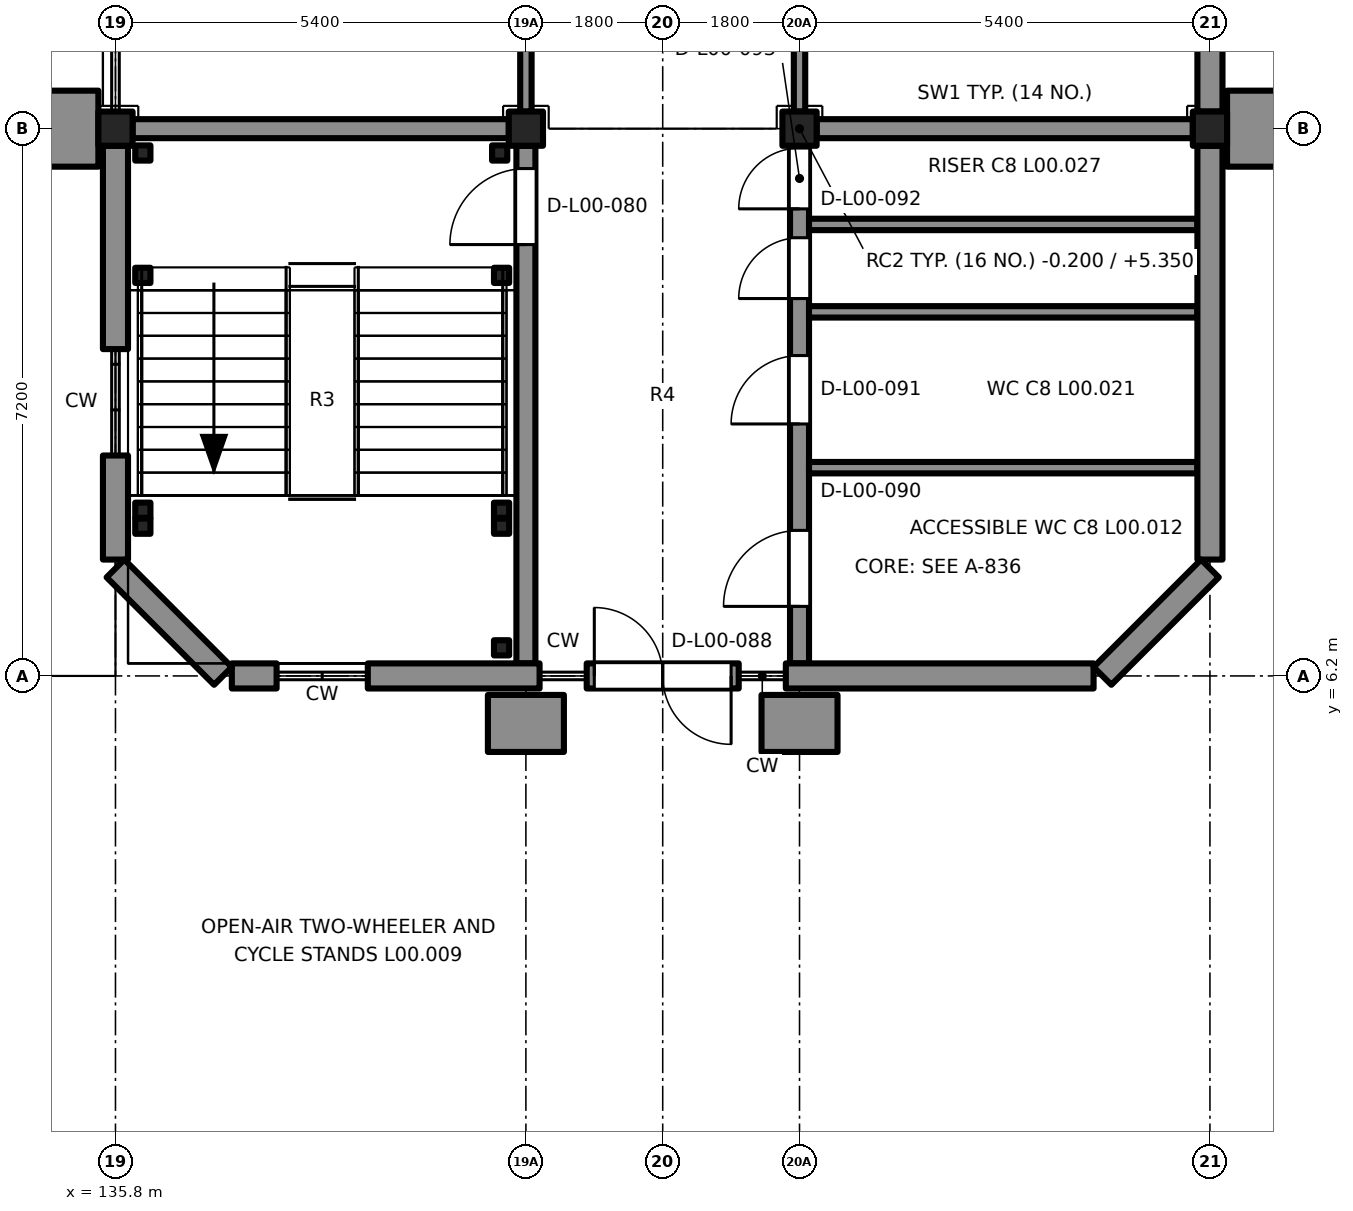
"""IFC4 building model, lengths in metres.
Left out: names, types, materials, properties, quantities, classifications, styles, units other than length and angle.
Written with IfcOpenShell. Run it as: python <this file> out.ifc"""

import sys

from ifc_helpers import new_model, si_unit, direction, frame, frame_2d, origin, origin_2d, place, context, subcontext, project, spatial, rectangle, extrude, element, fill, save


model = new_model("IFC4")
c1 = context("Model", 3, precision=1e-05, world=origin(), true_north=direction((0.0, 1.0)))
c2 = subcontext(c1, "Body", "Model", "MODEL_VIEW")
j1 = project(units=[si_unit("LENGTHUNIT", "METRE"), si_unit("PLANEANGLEUNIT", "RADIAN")], contexts=[c1])
p1 = place(None, origin())
s1 = spatial("IfcSite", under=j1, at=p1, CompositionType="ELEMENT")
p2 = place(p1, origin())
s2 = spatial("IfcBuilding", under=s1, at=p2, CompositionType="ELEMENT")
p3 = place(p2, origin())
s3 = spatial("IfcBuildingStorey", under=s2, at=p3, CompositionType="ELEMENT", Elevation=0.0)
for number, where, z_axis, x_axis in (
    (1, (135.8, 13.4, -0.2), (0.0, 0.0, 1.0), (1.0, 0.0, 0.0)),
    (2, (141.2, 13.4, -0.2), (0.0, 0.0, 1.0), (1.0, 0.0, 0.0)),
    (3, (144.8, 13.4, -0.2), (0.0, 0.0, 1.0), (1.0, 0.0, 0.0)),
    (4, (150.2, 13.4, -0.2), (0.0, 0.0, 1.0), (1.0, 0.0, 0.0)),
):
    element("IfcColumn", number, at=place(p3, frame(where, z_axis=z_axis, x_axis=x_axis)), inside=s3, PredefinedType="COLUMN", context=c2, shape_type="SweptSolid", body=[
        extrude(rectangle(XDim=0.45, YDim=0.45, at=origin_2d()), origin(), (0.0, 0.0, 1.0), 5.55),
    ])
p4 = place(p3, frame((141.2, 6.365, 0.0), z_axis=(0.0, 0.0, 1.0), x_axis=(0.0, 1.0, 0.0)))
e5 = element("IfcWall", 5, at=p4, inside=s3, PredefinedType="SHEAR", context=c2, shape_type="SweptSolid", body=[
    extrude(rectangle(XDim=6.81, YDim=0.25, at=frame_2d((3.405, 0.0))), origin(), (0.0, 0.0, 1.0), 6.05),
])
p5 = place(p4, frame((5.51, 0.0, 0.0)))
e6 = element("IfcOpeningElement", 6, at=p5, cuts=e5, PredefinedType="OPENING", context=c2, shape_type="SweptSolid", body=[
    extrude(rectangle(XDim=1.0, YDim=2.1, at=frame_2d((0.5, 1.05))), frame((0.0, 0.135, 0.0), z_axis=(0.0, -1.0, 0.0), x_axis=(1.0, 0.0, 0.0)), (0.0, 0.0, 1.0), 0.27),
])
p6 = place(p3, frame((136.025, 13.4, 0.0), z_axis=(0.0, 0.0, 1.0), x_axis=(1.0, 0.0, 0.0)))
e7 = element("IfcWall", 7, at=p6, inside=s3, PredefinedType="SHEAR", context=c2, shape_type="SweptSolid", body=[
    extrude(rectangle(XDim=4.95, YDim=0.25, at=frame_2d((2.475, 0.0))), origin(), (0.0, 0.0, 1.0), 6.05),
])
p7 = place(p3, frame((144.8, 6.365, 0.0), z_axis=(0.0, 0.0, 1.0), x_axis=(0.0, 1.0, 0.0)))
e8 = element("IfcWall", 8, at=p7, inside=s3, PredefinedType="SHEAR", context=c2, shape_type="SweptSolid", body=[
    extrude(rectangle(XDim=6.81, YDim=0.25, at=frame_2d((3.405, 0.0))), origin(), (0.0, 0.0, 1.0), 6.05),
])
p8 = place(p7, frame((0.75, 0.0, 0.0)))
e9 = element("IfcOpeningElement", 9, at=p8, cuts=e8, PredefinedType="OPENING", context=c2, shape_type="SweptSolid", body=[
    extrude(rectangle(XDim=1.0, YDim=2.1, at=frame_2d((0.5, 1.05))), frame((0.0, 0.135, 0.0), z_axis=(0.0, -1.0, 0.0), x_axis=(1.0, 0.0, 0.0)), (0.0, 0.0, 1.0), 0.27),
])
p9 = place(p7, frame((3.15, 0.0, 0.0)))
e10 = element("IfcOpeningElement", 10, at=p9, cuts=e8, PredefinedType="OPENING", context=c2, shape_type="SweptSolid", body=[
    extrude(rectangle(XDim=0.9, YDim=2.1, at=frame_2d((0.45, 1.05))), frame((0.0, 0.135, 0.0), z_axis=(0.0, -1.0, 0.0), x_axis=(1.0, 0.0, 0.0)), (0.0, 0.0, 1.0), 0.27),
])
p10 = place(p7, frame((4.8, 0.0, 0.0)))
e11 = element("IfcOpeningElement", 11, at=p10, cuts=e8, PredefinedType="OPENING", context=c2, shape_type="SweptSolid", body=[
    extrude(rectangle(XDim=0.8, YDim=2.1, at=frame_2d((0.4, 1.05))), frame((0.0, 0.135, 0.0), z_axis=(0.0, -1.0, 0.0), x_axis=(1.0, 0.0, 0.0)), (0.0, 0.0, 1.0), 0.27),
])
p11 = place(p7, frame((5.98, 0.0, 0.0)))
e12 = element("IfcOpeningElement", 12, at=p11, cuts=e8, PredefinedType="OPENING", context=c2, shape_type="SweptSolid", body=[
    extrude(rectangle(XDim=0.8, YDim=2.1, at=frame_2d((0.4, 1.05))), frame((0.0, 0.135, 0.0), z_axis=(0.0, -1.0, 0.0), x_axis=(1.0, 0.0, 0.0)), (0.0, 0.0, 1.0), 0.27),
])
p12 = place(p3, frame((145.025, 13.4, 0.0), z_axis=(0.0, 0.0, 1.0), x_axis=(1.0, 0.0, 0.0)))
e13 = element("IfcWall", 13, at=p12, inside=s3, PredefinedType="SHEAR", context=c2, shape_type="SweptSolid", body=[
    extrude(rectangle(XDim=4.95, YDim=0.25, at=frame_2d((2.475, 0.0))), origin(), (0.0, 0.0, 1.0), 6.05),
])
for number, where, z_axis, x_axis in (
    (14, (144.925, 8.94, 0.0), (0.0, 0.0, 1.0), (1.0, 0.0, 0.0)),
    (15, (144.925, 10.99, 0.0), (0.0, 0.0, 1.0), (1.0, 0.0, 0.0)),
    (16, (144.925, 12.14, 0.0), (0.0, 0.0, 1.0), (1.0, 0.0, 0.0)),
):
    element("IfcWall", number, at=place(p3, frame(where, z_axis=z_axis, x_axis=x_axis)), inside=s3, PredefinedType="PARTITIONING", context=c2, shape_type="SweptSolid", body=[
        extrude(rectangle(XDim=5.11, YDim=0.15, at=frame_2d((2.555, 0.0))), origin(), (0.0, 0.0, 1.0), 6.05),
    ])
p13 = place(p3, frame((136.16, 8.38, 0.0), z_axis=(0.0, 0.0, 1.0), x_axis=(1.0, 0.0, 0.0)))
e17 = element("IfcColumn", 17, at=p13, inside=s3, PredefinedType="COLUMN", context=c2, shape_type="SweptSolid", body=[
    extrude(rectangle(XDim=0.2, YDim=0.2, at=origin_2d()), origin(), (0.0, 0.0, 1.0), 4.45),
])
p14 = place(p3, frame((140.88, 6.57, 0.0), z_axis=(0.0, 0.0, 1.0), x_axis=(1.0, 0.0, 0.0)))
e18 = element("IfcColumn", 18, at=p14, inside=s3, PredefinedType="COLUMN", context=c2, shape_type="SweptSolid", body=[
    extrude(rectangle(XDim=0.2, YDim=0.2, at=origin_2d()), origin(), (0.0, 0.0, 1.0), 6.3),
])
p15 = place(p3, frame((140.88, 8.38, 0.0), z_axis=(0.0, 0.0, 1.0), x_axis=(1.0, 0.0, 0.0)))
e19 = element("IfcColumn", 19, at=p15, inside=s3, PredefinedType="COLUMN", context=c2, shape_type="SweptSolid", body=[
    extrude(rectangle(XDim=0.2, YDim=0.2, at=origin_2d()), origin(), (0.0, 0.0, 1.0), 4.45),
])
for number, where, z_axis, x_axis in (
    (20, (136.16, 11.47, 0.0), (0.0, 0.0, 1.0), (1.0, 0.0, 0.0)),
    (21, (136.16, 13.08, 0.0), (0.0, 0.0, 1.0), (1.0, 0.0, 0.0)),
    (22, (140.88, 11.47, 0.0), (0.0, 0.0, 1.0), (1.0, 0.0, 0.0)),
    (23, (140.855, 13.08, 0.0), (0.0, 0.0, 1.0), (1.0, 0.0, 0.0)),
):
    element("IfcColumn", number, at=place(p3, frame(where, z_axis=z_axis, x_axis=x_axis)), inside=s3, PredefinedType="COLUMN", context=c2, shape_type="SweptSolid", body=[
        extrude(rectangle(XDim=0.2, YDim=0.2, at=origin_2d()), origin(), (0.0, 0.0, 1.0), 2.95),
    ])
for number, where, z_axis, x_axis in (
    (24, (136.16, 8.17, 0.0), (0.0, 0.0, 1.0), (1.0, 0.0, 0.0)),
    (25, (140.88, 8.17, 0.0), (0.0, 0.0, 1.0), (1.0, 0.0, 0.0)),
):
    element("IfcColumn", number, at=place(p3, frame(where, z_axis=z_axis, x_axis=x_axis)), inside=s3, PredefinedType="COLUMN", context=c2, shape_type="SweptSolid", body=[
        extrude(rectangle(XDim=0.2, YDim=0.2, at=origin_2d()), origin(), (0.0, 0.0, 1.0), 6.3),
    ])
p16 = place(p3, frame((135.8, 7.731, 0.0), z_axis=(0.0, 0.0, 1.0), x_axis=(0.0, 1.0, 0.0)))
e26 = element("IfcWall", 26, at=p16, inside=s3, PredefinedType="SOLIDWALL", context=c2, shape_type="SweptSolid", body=[
    extrude(rectangle(XDim=1.369, YDim=0.33, at=frame_2d((0.685, 0.0))), origin(), (0.0, 0.0, 1.0), 5.35),
])
p17 = place(p3, frame((135.8, 10.5, 0.0), z_axis=(0.0, 0.0, 1.0), x_axis=(0.0, 1.0, 0.0)))
e27 = element("IfcWall", 27, at=p17, inside=s3, PredefinedType="SOLIDWALL", context=c2, shape_type="SweptSolid", body=[
    extrude(rectangle(XDim=2.675, YDim=0.33, at=frame_2d((1.337, 0.0))), origin(), (0.0, 0.0, 1.0), 5.35),
])
p18 = place(p3, frame((135.2, 12.9, 0.0), z_axis=(0.0, 0.0, 1.0), x_axis=(0.0, 1.0, 0.0)))
e28 = element("IfcWall", 28, at=p18, inside=s3, PredefinedType="SOLIDWALL", context=c2, shape_type="SweptSolid", body=[
    extrude(rectangle(XDim=1.0, YDim=0.75, at=frame_2d((0.5, 0.0))), origin(), (0.0, 0.0, 1.0), 6.3),
])
p19 = place(p3, frame((150.2, 13.175, 0.0), z_axis=(0.0, 0.0, 1.0), x_axis=(0.0, -1.0, 0.0)))
e29 = element("IfcWall", 29, at=p19, inside=s3, PredefinedType="SOLIDWALL", context=c2, shape_type="SweptSolid", body=[
    extrude(rectangle(XDim=5.444, YDim=0.33, at=frame_2d((2.722, 0.0))), origin(), (0.0, 0.0, 1.0), 5.35),
])
p20 = place(p3, frame((150.2, 20.375, 0.0), z_axis=(0.0, 0.0, 1.0), x_axis=(0.0, -1.0, 0.0)))
e30 = element("IfcWall", 30, at=p20, inside=s3, PredefinedType="SOLIDWALL", context=c2, shape_type="SweptSolid", body=[
    extrude(rectangle(XDim=6.75, YDim=0.33, at=frame_2d((3.375, 0.0))), origin(), (0.0, 0.0, 1.0), 5.35),
])
p21 = place(p20, frame((4.575, 0.0, 0.6)))
e31 = element("IfcOpeningElement", 31, at=p21, cuts=e30, PredefinedType="OPENING", context=c2, shape_type="SweptSolid", body=[
    extrude(rectangle(XDim=1.2, YDim=2.1, at=frame_2d((0.6, 1.05))), frame((0.0, 0.175, 0.0), z_axis=(0.0, -1.0, 0.0), x_axis=(1.0, 0.0, 0.0)), (0.0, 0.0, 1.0), 0.35),
])
p22 = place(p20, frame((0.975, 0.0, 0.6)))
e32 = element("IfcOpeningElement", 32, at=p22, cuts=e30, PredefinedType="OPENING", context=c2, shape_type="SweptSolid", body=[
    extrude(rectangle(XDim=1.2, YDim=2.1, at=frame_2d((0.6, 1.05))), frame((0.0, 0.175, 0.0), z_axis=(0.0, -1.0, 0.0), x_axis=(1.0, 0.0, 0.0)), (0.0, 0.0, 1.0), 0.35),
])
p23 = place(p3, frame((150.8, 13.9, 0.0), z_axis=(0.0, 0.0, 1.0), x_axis=(0.0, -1.0, 0.0)))
e33 = element("IfcWall", 33, at=p23, inside=s3, PredefinedType="SOLIDWALL", context=c2, shape_type="SweptSolid", body=[
    extrude(rectangle(XDim=1.0, YDim=0.75, at=frame_2d((0.5, 0.0))), origin(), (0.0, 0.0, 1.0), 6.3),
])
p24 = place(p3, frame((137.92, 6.2, 0.0), z_axis=(0.0, 0.0, 1.0), x_axis=(-1.0, 0.0, 0.0)))
e34 = element("IfcWall", 34, at=p24, inside=s3, PredefinedType="SOLIDWALL", context=c2, shape_type="SweptSolid", body=[
    extrude(rectangle(XDim=0.589, YDim=0.33, at=frame_2d((0.294, 0.0))), origin(), (0.0, 0.0, 1.0), 5.5),
])
p25 = place(p3, frame((141.38, 6.2, 0.0), z_axis=(0.0, 0.0, 1.0), x_axis=(-1.0, 0.0, 0.0)))
e35 = element("IfcWall", 35, at=p25, inside=s3, PredefinedType="SOLIDWALL", context=c2, shape_type="SweptSolid", body=[
    extrude(rectangle(XDim=2.26, YDim=0.33, at=frame_2d((1.13, 0.0))), origin(), (0.0, 0.0, 1.0), 5.5),
])
p26 = place(p3, frame((144.0, 6.2, 0.0), z_axis=(0.0, 0.0, 1.0), x_axis=(-1.0, 0.0, 0.0)))
e36 = element("IfcWall", 36, at=p26, inside=s3, PredefinedType="SOLIDWALL", context=c2, shape_type="SweptSolid", body=[
    extrude(rectangle(XDim=2.0, YDim=0.33, at=frame_2d((1.0, 0.0))), origin(), (0.0, 0.0, 1.0), 5.5),
])
p27 = place(p26, frame((0.1, 0.0, 0.0)))
e37 = element("IfcOpeningElement", 37, at=p27, cuts=e36, PredefinedType="OPENING", context=c2, shape_type="SweptSolid", body=[
    extrude(rectangle(XDim=1.8, YDim=2.4, at=frame_2d((0.9, 1.2))), frame((0.0, 0.175, 0.0), z_axis=(0.0, -1.0, 0.0), x_axis=(1.0, 0.0, 0.0)), (0.0, 0.0, 1.0), 0.35),
])
p28 = place(p3, frame((148.669, 6.2, 0.0), z_axis=(0.0, 0.0, 1.0), x_axis=(-1.0, 0.0, 0.0)))
e38 = element("IfcWall", 38, at=p28, inside=s3, PredefinedType="SOLIDWALL", context=c2, shape_type="SweptSolid", body=[
    extrude(rectangle(XDim=4.049, YDim=0.33, at=frame_2d((2.024, 0.0))), origin(), (0.0, 0.0, 1.0), 5.5),
])
for number, where, z_axis, x_axis in (
    (39, (141.7, 5.575, 0.0), (0.0, 0.0, 1.0), (-1.0, 0.0, 0.0)),
    (40, (145.3, 5.575, 0.0), (0.0, 0.0, 1.0), (-1.0, 0.0, 0.0)),
):
    element("IfcWall", number, at=place(p3, frame(where, z_axis=z_axis, x_axis=x_axis)), inside=s3, PredefinedType="SOLIDWALL", context=c2, shape_type="SweptSolid", body=[
        extrude(rectangle(XDim=1.0, YDim=0.75, at=frame_2d((0.5, 0.0))), origin(), (0.0, 0.0, 1.0), 6.3),
    ])
for number, where, z_axis, x_axis in (
    (41, (135.8, 7.614, 0.0), (0.0, 0.0, 1.0), (0.707, -0.707, 0.0)),
    (42, (150.2, 7.614, 0.0), (0.0, 0.0, 1.0), (-0.707, -0.707, 0.0)),
):
    element("IfcWall", number, at=place(p3, frame(where, z_axis=z_axis, x_axis=x_axis)), inside=s3, PredefinedType="SOLIDWALL", context=c2, shape_type="SweptSolid", body=[
        extrude(rectangle(XDim=2.0, YDim=0.33, at=frame_2d((1.0, 0.0))), origin(), (0.0, 0.0, 1.0), 5.5),
    ])
p29 = place(p3, frame((141.2, 13.625, 0.0), z_axis=(0.0, 0.0, 1.0), x_axis=(0.0, 1.0, 0.0)))
e43 = element("IfcWall", 43, at=p29, inside=s3, PredefinedType="PARTITIONING", context=c2, shape_type="SweptSolid", body=[
    extrude(rectangle(XDim=6.75, YDim=0.15, at=frame_2d((3.375, 0.0))), origin(), (0.0, 0.0, 1.0), 5.35),
])
p30 = place(p29, frame((1.075, 0.0, 0.0)))
e44 = element("IfcOpeningElement", 44, at=p30, cuts=e43, PredefinedType="OPENING", context=c2, shape_type="SweptSolid", body=[
    extrude(rectangle(XDim=1.0, YDim=2.1, at=frame_2d((0.5, 1.05))), frame((0.0, 0.085, 0.0), z_axis=(0.0, -1.0, 0.0), x_axis=(1.0, 0.0, 0.0)), (0.0, 0.0, 1.0), 0.17),
])
p31 = place(p3, frame((144.8, 20.375, 0.0), z_axis=(0.0, 0.0, 1.0), x_axis=(0.0, -1.0, 0.0)))
e45 = element("IfcWall", 45, at=p31, inside=s3, PredefinedType="PARTITIONING", context=c2, shape_type="SweptSolid", body=[
    extrude(rectangle(XDim=6.75, YDim=0.15, at=frame_2d((3.375, 0.0))), origin(), (0.0, 0.0, 1.0), 5.35),
])
p32 = place(p31, frame((4.675, 0.0, 0.0)))
e46 = element("IfcOpeningElement", 46, at=p32, cuts=e45, PredefinedType="OPENING", context=c2, shape_type="SweptSolid", body=[
    extrude(rectangle(XDim=1.0, YDim=2.1, at=frame_2d((0.5, 1.05))), frame((0.0, 0.085, 0.0), z_axis=(0.0, -1.0, 0.0), x_axis=(1.0, 0.0, 0.0)), (0.0, 0.0, 1.0), 0.17),
])
p33 = place(p5, origin())
e47 = element("IfcDoor", 47, at=p33, inside=s3, OperationType="SINGLE_SWING_RIGHT", PredefinedType="DOOR", context=c2, shape_type="SweptSolid", body=[
    extrude(rectangle(XDim=1.0, YDim=2.1, at=frame_2d((0.5, 1.05))), frame((0.0, 0.025, 0.0), z_axis=(0.0, -1.0, 0.0), x_axis=(1.0, 0.0, 0.0)), (0.0, 0.0, 1.0), 0.05),
])
fill(e6, e47)
p34 = place(p8, origin())
e48 = element("IfcDoor", 48, at=p34, inside=s3, OperationType="SINGLE_SWING_LEFT", PredefinedType="DOOR", context=c2, shape_type="SweptSolid", body=[
    extrude(rectangle(XDim=1.0, YDim=2.1, at=frame_2d((0.5, 1.05))), frame((0.0, 0.025, 0.0), z_axis=(0.0, -1.0, 0.0), x_axis=(1.0, 0.0, 0.0)), (0.0, 0.0, 1.0), 0.05),
])
fill(e9, e48)
p35 = place(p9, origin())
e49 = element("IfcDoor", 49, at=p35, inside=s3, OperationType="SINGLE_SWING_LEFT", PredefinedType="DOOR", context=c2, shape_type="SweptSolid", body=[
    extrude(rectangle(XDim=0.9, YDim=2.1, at=frame_2d((0.45, 1.05))), frame((0.0, 0.025, 0.0), z_axis=(0.0, -1.0, 0.0), x_axis=(1.0, 0.0, 0.0)), (0.0, 0.0, 1.0), 0.05),
])
fill(e10, e49)
p36 = place(p10, origin())
e50 = element("IfcDoor", 50, at=p36, inside=s3, OperationType="SINGLE_SWING_LEFT", PredefinedType="DOOR", context=c2, shape_type="SweptSolid", body=[
    extrude(rectangle(XDim=0.8, YDim=2.1, at=frame_2d((0.4, 1.05))), frame((0.0, 0.025, 0.0), z_axis=(0.0, -1.0, 0.0), x_axis=(1.0, 0.0, 0.0)), (0.0, 0.0, 1.0), 0.05),
])
fill(e11, e50)
p37 = place(p11, origin())
e51 = element("IfcDoor", 51, at=p37, inside=s3, OperationType="SINGLE_SWING_LEFT", PredefinedType="DOOR", context=c2, shape_type="SweptSolid", body=[
    extrude(rectangle(XDim=0.8, YDim=2.1, at=frame_2d((0.4, 1.05))), frame((0.0, 0.025, 0.0), z_axis=(0.0, -1.0, 0.0), x_axis=(1.0, 0.0, 0.0)), (0.0, 0.0, 1.0), 0.05),
])
fill(e12, e51)
p38 = place(p27, origin())
e52 = element("IfcDoor", 52, at=p38, inside=s3, OperationType="DOUBLE_DOOR_SINGLE_SWING", PredefinedType="DOOR", context=c2, shape_type="SweptSolid", body=[
    extrude(rectangle(XDim=1.8, YDim=2.4, at=frame_2d((0.9, 1.2))), frame((0.0, 0.025, 0.0), z_axis=(0.0, -1.0, 0.0), x_axis=(1.0, 0.0, 0.0)), (0.0, 0.0, 1.0), 0.05),
])
fill(e37, e52)
save(model, sys.argv[1])
